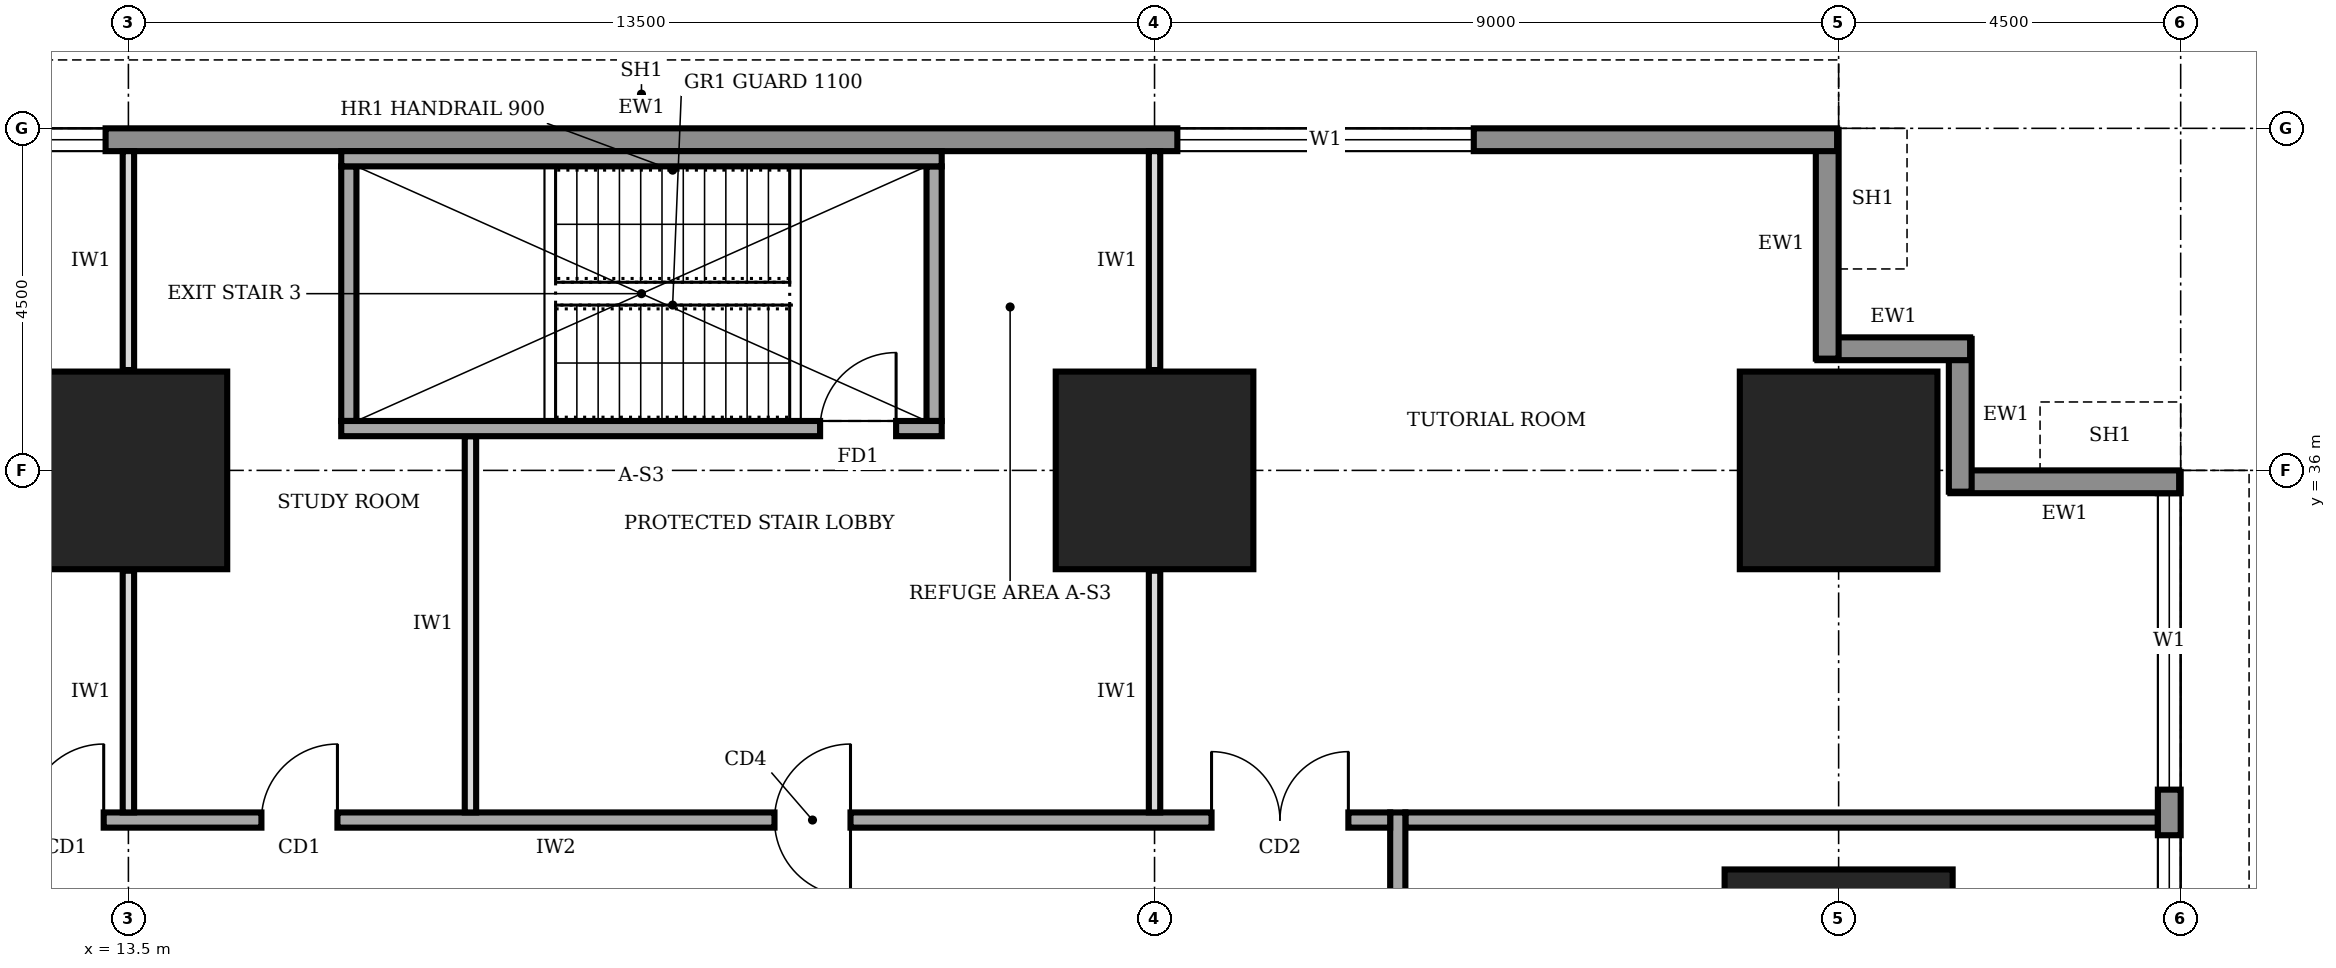
"""IFC4 building model, lengths in metres.
Left out: names, types, materials, properties, quantities, classifications, styles, units other than length and angle.
Written with IfcOpenShell. Run it as: python <this file> out.ifc"""

import sys

from ifc_helpers import new_model, si_unit, direction, frame, frame_2d, origin, origin_2d, place, context, subcontext, project, spatial, rectangle, extrude, element, fill, save


model = new_model("IFC4")
c1 = context("Model", 3, precision=1e-05, world=origin(), true_north=direction((0.0, 1.0)))
c2 = subcontext(c1, "Body", "Model", "MODEL_VIEW")
j1 = project(units=[si_unit("LENGTHUNIT", "METRE"), si_unit("PLANEANGLEUNIT", "RADIAN")], contexts=[c1])
p1 = place(None, origin())
s1 = spatial("IfcSite", under=j1, at=p1, CompositionType="ELEMENT")
p2 = place(p1, origin())
s2 = spatial("IfcBuilding", under=s1, at=p2, CompositionType="ELEMENT")
p3 = place(p2, frame((0.0, 0.0, 45.0)))
s3 = spatial("IfcBuildingStorey", under=s2, at=p3, CompositionType="ELEMENT", Elevation=45.0)
p4 = place(p3, frame((36.0, 29.25, 0.0), z_axis=(0.0, 0.0, 1.0), x_axis=(1.0, 0.0, 0.0)))
e1 = element("IfcColumn", 1, at=p4, inside=s3, PredefinedType="COLUMN", context=c2, shape_type="SweptSolid", body=[
    extrude(rectangle(XDim=3.0, YDim=3.0, at=origin_2d()), origin(), (0.0, 0.0, 1.0), 4.0),
])
for number, where, z_axis, x_axis in (
    (2, (13.5, 36.0, 0.0), (0.0, 0.0, 1.0), (1.0, 0.0, 0.0)),
    (3, (27.0, 36.0, 0.0), (0.0, 0.0, 1.0), (1.0, 0.0, 0.0)),
    (4, (36.0, 36.0, 0.0), (0.0, 0.0, 1.0), (1.0, 0.0, 0.0)),
):
    element("IfcColumn", number, at=place(p3, frame(where, z_axis=z_axis, x_axis=x_axis)), inside=s3, PredefinedType="COLUMN", context=c2, shape_type="SweptSolid", body=[
        extrude(rectangle(XDim=2.6, YDim=2.6, at=origin_2d()), origin(), (0.0, 0.0, 1.0), 4.0),
    ])
p5 = place(p3, frame((40.35, 4.52, 0.0), z_axis=(0.0, 0.0, 1.0), x_axis=(0.0, 1.0, 0.0)))
e5 = element("IfcWall", 5, at=p5, inside=s3, PredefinedType="STANDARD", context=c2, shape_type="SweptSolid", body=[
    extrude(rectangle(XDim=31.46, YDim=0.3, at=frame_2d((15.73, 0.0))), origin(), (0.0, 0.0, 1.0), 3.75),
])
p6 = place(p5, frame((4.78, 0.0, 0.9)))
e6 = element("IfcOpeningElement", 6, at=p6, cuts=e5, PredefinedType="OPENING", context=c2, shape_type="SweptSolid", body=[
    extrude(rectangle(XDim=3.9, YDim=2.2, at=frame_2d((1.95, 1.1))), frame((0.0, 0.16, 0.0), z_axis=(0.0, -1.0, 0.0), x_axis=(1.0, 0.0, 0.0)), (0.0, 0.0, 1.0), 0.32),
])
p7 = place(p5, frame((9.28, 0.0, 0.9)))
e7 = element("IfcOpeningElement", 7, at=p7, cuts=e5, PredefinedType="OPENING", context=c2, shape_type="SweptSolid", body=[
    extrude(rectangle(XDim=3.9, YDim=2.2, at=frame_2d((1.95, 1.1))), frame((0.0, 0.16, 0.0), z_axis=(0.0, -1.0, 0.0), x_axis=(1.0, 0.0, 0.0)), (0.0, 0.0, 1.0), 0.32),
])
p8 = place(p5, frame((13.78, 0.0, 0.9)))
e8 = element("IfcOpeningElement", 8, at=p8, cuts=e5, PredefinedType="OPENING", context=c2, shape_type="SweptSolid", body=[
    extrude(rectangle(XDim=3.9, YDim=2.2, at=frame_2d((1.95, 1.1))), frame((0.0, 0.16, 0.0), z_axis=(0.0, -1.0, 0.0), x_axis=(1.0, 0.0, 0.0)), (0.0, 0.0, 1.0), 0.32),
])
p9 = place(p5, frame((18.28, 0.0, 0.9)))
e9 = element("IfcOpeningElement", 9, at=p9, cuts=e5, PredefinedType="OPENING", context=c2, shape_type="SweptSolid", body=[
    extrude(rectangle(XDim=3.9, YDim=2.2, at=frame_2d((1.95, 1.1))), frame((0.0, 0.16, 0.0), z_axis=(0.0, -1.0, 0.0), x_axis=(1.0, 0.0, 0.0)), (0.0, 0.0, 1.0), 0.32),
])
p10 = place(p5, frame((22.78, 0.0, 0.9)))
e10 = element("IfcOpeningElement", 10, at=p10, cuts=e5, PredefinedType="OPENING", context=c2, shape_type="SweptSolid", body=[
    extrude(rectangle(XDim=3.9, YDim=2.2, at=frame_2d((1.95, 1.1))), frame((0.0, 0.16, 0.0), z_axis=(0.0, -1.0, 0.0), x_axis=(1.0, 0.0, 0.0)), (0.0, 0.0, 1.0), 0.32),
])
p11 = place(p5, frame((27.28, 0.0, 0.9)))
e11 = element("IfcOpeningElement", 11, at=p11, cuts=e5, PredefinedType="OPENING", context=c2, shape_type="SweptSolid", body=[
    extrude(rectangle(XDim=3.9, YDim=2.2, at=frame_2d((1.95, 1.1))), frame((0.0, 0.16, 0.0), z_axis=(0.0, -1.0, 0.0), x_axis=(1.0, 0.0, 0.0)), (0.0, 0.0, 1.0), 0.32),
])
p12 = place(p3, frame((40.48, 35.85, 0.0), z_axis=(0.0, 0.0, 1.0), x_axis=(-1.0, 0.0, 0.0)))
e12 = element("IfcWall", 12, at=p12, inside=s3, PredefinedType="STANDARD", context=c2, shape_type="SweptSolid", body=[
    extrude(rectangle(XDim=3.01, YDim=0.3, at=frame_2d((1.505, 0.0))), origin(), (0.0, 0.0, 1.0), 2.85),
])
for number, where, z_axis, x_axis in (
    (13, (37.6, 35.72, 0.0), (0.0, 0.0, 1.0), (0.0, 1.0, 0.0)),
    (14, (37.73, 37.6, 0.0), (0.0, 0.0, 1.0), (-1.0, 0.0, 0.0)),
):
    element("IfcWall", number, at=place(p3, frame(where, z_axis=z_axis, x_axis=x_axis)), inside=s3, PredefinedType="STANDARD", context=c2, shape_type="SweptSolid", body=[
        extrude(rectangle(XDim=2.01, YDim=0.3, at=frame_2d((1.005, 0.0))), origin(), (0.0, 0.0, 1.0), 3.75),
    ])
p13 = place(p3, frame((35.85, 37.47, 0.0), z_axis=(0.0, 0.0, 1.0), x_axis=(0.0, 1.0, 0.0)))
e15 = element("IfcWall", 15, at=p13, inside=s3, PredefinedType="STANDARD", context=c2, shape_type="SweptSolid", body=[
    extrude(rectangle(XDim=3.01, YDim=0.3, at=frame_2d((1.505, 0.0))), origin(), (0.0, 0.0, 1.0), 2.85),
])
p14 = place(p3, frame((35.98, 40.35, 0.0), z_axis=(0.0, 0.0, 1.0), x_axis=(-1.0, 0.0, 0.0)))
e16 = element("IfcWall", 16, at=p14, inside=s3, PredefinedType="STANDARD", context=c2, shape_type="SweptSolid", body=[
    extrude(rectangle(XDim=31.46, YDim=0.3, at=frame_2d((15.73, 0.0))), origin(), (0.0, 0.0, 1.0), 3.75),
])
p15 = place(p14, frame((27.28, 0.0, 0.9)))
e17 = element("IfcOpeningElement", 17, at=p15, cuts=e16, PredefinedType="OPENING", context=c2, shape_type="SweptSolid", body=[
    extrude(rectangle(XDim=3.9, YDim=2.2, at=frame_2d((1.95, 1.1))), frame((0.0, 0.16, 0.0), z_axis=(0.0, -1.0, 0.0), x_axis=(1.0, 0.0, 0.0)), (0.0, 0.0, 1.0), 0.32),
])
p16 = place(p14, frame((22.78, 0.0, 0.9)))
e18 = element("IfcOpeningElement", 18, at=p16, cuts=e16, PredefinedType="OPENING", context=c2, shape_type="SweptSolid", body=[
    extrude(rectangle(XDim=3.9, YDim=2.2, at=frame_2d((1.95, 1.1))), frame((0.0, 0.16, 0.0), z_axis=(0.0, -1.0, 0.0), x_axis=(1.0, 0.0, 0.0)), (0.0, 0.0, 1.0), 0.32),
])
p17 = place(p14, frame((4.78, 0.0, 0.9)))
e19 = element("IfcOpeningElement", 19, at=p17, cuts=e16, PredefinedType="OPENING", context=c2, shape_type="SweptSolid", body=[
    extrude(rectangle(XDim=3.9, YDim=2.2, at=frame_2d((1.95, 1.1))), frame((0.0, 0.16, 0.0), z_axis=(0.0, -1.0, 0.0), x_axis=(1.0, 0.0, 0.0)), (0.0, 0.0, 1.0), 0.32),
])
p18 = place(p3, frame((30.2, 9.2, 0.0), z_axis=(0.0, 0.0, 1.0), x_axis=(0.0, 1.0, 0.0)))
e20 = element("IfcWall", 20, at=p18, inside=s3, PredefinedType="SOLIDWALL", context=c2, shape_type="SweptSolid", body=[
    extrude(rectangle(XDim=22.3, YDim=0.2, at=frame_2d((11.15, 0.0))), origin(), (0.0, 0.0, 1.0), 3.75),
])
p19 = place(p18, frame((1.55, 0.0, 0.0)))
e21 = element("IfcOpeningElement", 21, at=p19, cuts=e20, PredefinedType="OPENING", context=c2, shape_type="SweptSolid", body=[
    extrude(rectangle(XDim=1.0, YDim=2.1, at=frame_2d((0.5, 1.05))), frame((0.0, 0.11, 0.0), z_axis=(0.0, -1.0, 0.0), x_axis=(1.0, 0.0, 0.0)), (0.0, 0.0, 1.0), 0.22),
])
p20 = place(p18, frame((8.3, 0.0, 0.0)))
e22 = element("IfcOpeningElement", 22, at=p20, cuts=e20, PredefinedType="OPENING", context=c2, shape_type="SweptSolid", body=[
    extrude(rectangle(XDim=1.0, YDim=2.1, at=frame_2d((0.5, 1.05))), frame((0.0, 0.11, 0.0), z_axis=(0.0, -1.0, 0.0), x_axis=(1.0, 0.0, 0.0)), (0.0, 0.0, 1.0), 0.22),
])
p21 = place(p18, frame((17.3, 0.0, 0.0)))
e23 = element("IfcOpeningElement", 23, at=p21, cuts=e20, PredefinedType="OPENING", context=c2, shape_type="SweptSolid", body=[
    extrude(rectangle(XDim=1.0, YDim=2.1, at=frame_2d((0.5, 1.05))), frame((0.0, 0.11, 0.0), z_axis=(0.0, -1.0, 0.0), x_axis=(1.0, 0.0, 0.0)), (0.0, 0.0, 1.0), 0.22),
])
p22 = place(p3, frame((30.1, 31.4, 0.0), z_axis=(0.0, 0.0, 1.0), x_axis=(-1.0, 0.0, 0.0)))
e24 = element("IfcWall", 24, at=p22, inside=s3, PredefinedType="SOLIDWALL", context=c2, shape_type="SweptSolid", body=[
    extrude(rectangle(XDim=18.4, YDim=0.2, at=frame_2d((9.2, 0.0))), origin(), (0.0, 0.0, 1.0), 3.75),
])
p23 = place(p22, frame((16.925, 0.0, 0.0)))
e25 = element("IfcOpeningElement", 25, at=p23, cuts=e24, PredefinedType="OPENING", context=c2, shape_type="SweptSolid", body=[
    extrude(rectangle(XDim=1.0, YDim=2.1, at=frame_2d((0.5, 1.05))), frame((0.0, 0.11, 0.0), z_axis=(0.0, -1.0, 0.0), x_axis=(1.0, 0.0, 0.0)), (0.0, 0.0, 1.0), 0.22),
])
p24 = place(p22, frame((13.85, 0.0, 0.0)))
e26 = element("IfcOpeningElement", 26, at=p24, cuts=e24, PredefinedType="OPENING", context=c2, shape_type="SweptSolid", body=[
    extrude(rectangle(XDim=1.0, YDim=2.1, at=frame_2d((0.5, 1.05))), frame((0.0, 0.11, 0.0), z_axis=(0.0, -1.0, 0.0), x_axis=(1.0, 0.0, 0.0)), (0.0, 0.0, 1.0), 0.22),
])
p25 = place(p22, frame((7.1, 0.0, 0.0)))
e27 = element("IfcOpeningElement", 27, at=p25, cuts=e24, PredefinedType="OPENING", context=c2, shape_type="SweptSolid", body=[
    extrude(rectangle(XDim=1.0, YDim=2.1, at=frame_2d((0.5, 1.05))), frame((0.0, 0.11, 0.0), z_axis=(0.0, -1.0, 0.0), x_axis=(1.0, 0.0, 0.0)), (0.0, 0.0, 1.0), 0.22),
])
p26 = place(p22, frame((0.55, 0.0, 0.0)))
e28 = element("IfcOpeningElement", 28, at=p26, cuts=e24, PredefinedType="OPENING", context=c2, shape_type="SweptSolid", body=[
    extrude(rectangle(XDim=1.8, YDim=2.1, at=frame_2d((0.9, 1.05))), frame((0.0, 0.11, 0.0), z_axis=(0.0, -1.0, 0.0), x_axis=(1.0, 0.0, 0.0)), (0.0, 0.0, 1.0), 0.22),
])
p27 = place(p3, frame((30.3, 31.4, 0.0), z_axis=(0.0, 0.0, 1.0), x_axis=(1.0, 0.0, 0.0)))
e29 = element("IfcWall", 29, at=p27, inside=s3, PredefinedType="SOLIDWALL", context=c2, shape_type="SweptSolid", body=[
    extrude(rectangle(XDim=9.9, YDim=0.2, at=frame_2d((4.95, 0.0))), origin(), (0.0, 0.0, 1.0), 3.75),
])
p28 = place(p3, frame((13.5, 31.5, 0.0), z_axis=(0.0, 0.0, 1.0), x_axis=(0.0, 1.0, 0.0)))
e30 = element("IfcWall", 30, at=p28, inside=s3, PredefinedType="PARTITIONING", context=c2, shape_type="SweptSolid", body=[
    extrude(rectangle(XDim=3.18, YDim=0.15, at=frame_2d((1.59, 0.0))), origin(), (0.0, 0.0, 1.0), 2.85),
])
p29 = place(p3, frame((13.5, 37.32, 0.0), z_axis=(0.0, 0.0, 1.0), x_axis=(0.0, 1.0, 0.0)))
e31 = element("IfcWall", 31, at=p29, inside=s3, PredefinedType="PARTITIONING", context=c2, shape_type="SweptSolid", body=[
    extrude(rectangle(XDim=2.88, YDim=0.15, at=frame_2d((1.44, 0.0))), origin(), (0.0, 0.0, 1.0), 2.85),
])
p30 = place(p3, frame((18.0, 31.5, 0.0), z_axis=(0.0, 0.0, 1.0), x_axis=(0.0, 1.0, 0.0)))
e32 = element("IfcWall", 32, at=p30, inside=s3, PredefinedType="PARTITIONING", context=c2, shape_type="SweptSolid", body=[
    extrude(rectangle(XDim=4.95, YDim=0.15, at=frame_2d((2.475, 0.0))), origin(), (0.0, 0.0, 1.0), 3.75),
])
p31 = place(p3, frame((27.0, 31.5, 0.0), z_axis=(0.0, 0.0, 1.0), x_axis=(0.0, 1.0, 0.0)))
e33 = element("IfcWall", 33, at=p31, inside=s3, PredefinedType="PARTITIONING", context=c2, shape_type="SweptSolid", body=[
    extrude(rectangle(XDim=3.18, YDim=0.15, at=frame_2d((1.59, 0.0))), origin(), (0.0, 0.0, 1.0), 2.85),
])
p32 = place(p3, frame((27.0, 37.32, 0.0), z_axis=(0.0, 0.0, 1.0), x_axis=(0.0, 1.0, 0.0)))
e34 = element("IfcWall", 34, at=p32, inside=s3, PredefinedType="PARTITIONING", context=c2, shape_type="SweptSolid", body=[
    extrude(rectangle(XDim=2.88, YDim=0.15, at=frame_2d((1.44, 0.0))), origin(), (0.0, 0.0, 1.0), 2.85),
])
p33 = place(p3, frame((16.3, 36.55, 0.0), z_axis=(0.0, 0.0, 1.0), x_axis=(1.0, 0.0, 0.0)))
e35 = element("IfcWall", 35, at=p33, inside=s3, PredefinedType="SOLIDWALL", context=c2, shape_type="SweptSolid", body=[
    extrude(rectangle(XDim=7.9, YDim=0.2, at=frame_2d((3.95, 0.0))), origin(), (0.0, 0.0, 1.0), 3.75),
])
p34 = place(p33, frame((6.3, 0.0, 0.0)))
e36 = element("IfcOpeningElement", 36, at=p34, cuts=e35, PredefinedType="OPENING", context=c2, shape_type="SweptSolid", body=[
    extrude(rectangle(XDim=1.0, YDim=2.1, at=frame_2d((0.5, 1.05))), frame((0.0, 0.11, 0.0), z_axis=(0.0, -1.0, 0.0), x_axis=(1.0, 0.0, 0.0)), (0.0, 0.0, 1.0), 0.22),
])
p35 = place(p3, frame((16.3, 40.1, 0.0), z_axis=(0.0, 0.0, 1.0), x_axis=(1.0, 0.0, 0.0)))
e37 = element("IfcWall", 37, at=p35, inside=s3, PredefinedType="SOLIDWALL", context=c2, shape_type="SweptSolid", body=[
    extrude(rectangle(XDim=7.9, YDim=0.2, at=frame_2d((3.95, 0.0))), origin(), (0.0, 0.0, 1.0), 3.75),
])
for number, where, z_axis, x_axis in (
    (38, (16.4, 36.65, 0.0), (0.0, 0.0, 1.0), (0.0, 1.0, 0.0)),
    (39, (24.1, 36.65, 0.0), (0.0, 0.0, 1.0), (0.0, 1.0, 0.0)),
):
    element("IfcWall", number, at=place(p3, frame(where, z_axis=z_axis, x_axis=x_axis)), inside=s3, PredefinedType="SOLIDWALL", context=c2, shape_type="SweptSolid", body=[
        extrude(rectangle(XDim=3.35, YDim=0.2, at=frame_2d((1.675, 0.0))), origin(), (0.0, 0.0, 1.0), 3.75),
    ])
p36 = place(p10, origin())
e40 = element("IfcWindow", 40, at=p36, inside=s3, PartitioningType="SINGLE_PANEL", PredefinedType="WINDOW", context=c2, shape_type="SweptSolid", body=[
    extrude(rectangle(XDim=3.9, YDim=2.2, at=frame_2d((1.95, 1.1))), frame((0.0, 0.03, 0.0), z_axis=(0.0, -1.0, 0.0), x_axis=(1.0, 0.0, 0.0)), (0.0, 0.0, 1.0), 0.06),
])
fill(e10, e40)
p37 = place(p11, origin())
e41 = element("IfcWindow", 41, at=p37, inside=s3, PartitioningType="SINGLE_PANEL", PredefinedType="WINDOW", context=c2, shape_type="SweptSolid", body=[
    extrude(rectangle(XDim=3.9, YDim=2.2, at=frame_2d((1.95, 1.1))), frame((0.0, 0.03, 0.0), z_axis=(0.0, -1.0, 0.0), x_axis=(1.0, 0.0, 0.0)), (0.0, 0.0, 1.0), 0.06),
])
fill(e11, e41)
p38 = place(p16, origin())
e42 = element("IfcWindow", 42, at=p38, inside=s3, PartitioningType="SINGLE_PANEL", PredefinedType="WINDOW", context=c2, shape_type="SweptSolid", body=[
    extrude(rectangle(XDim=3.9, YDim=2.2, at=frame_2d((1.95, 1.1))), frame((0.0, 0.03, 0.0), z_axis=(0.0, -1.0, 0.0), x_axis=(1.0, 0.0, 0.0)), (0.0, 0.0, 1.0), 0.06),
])
fill(e18, e42)
p39 = place(p17, origin())
e43 = element("IfcWindow", 43, at=p39, inside=s3, PartitioningType="SINGLE_PANEL", PredefinedType="WINDOW", context=c2, shape_type="SweptSolid", body=[
    extrude(rectangle(XDim=3.9, YDim=2.2, at=frame_2d((1.95, 1.1))), frame((0.0, 0.03, 0.0), z_axis=(0.0, -1.0, 0.0), x_axis=(1.0, 0.0, 0.0)), (0.0, 0.0, 1.0), 0.06),
])
fill(e19, e43)
p40 = place(p23, frame((1.0, 0.0, 0.0), z_axis=(0.0, 0.0, 1.0), x_axis=(-1.0, 0.0, 0.0)))
e44 = element("IfcDoor", 44, at=p40, inside=s3, OperationType="SINGLE_SWING_RIGHT", PredefinedType="DOOR", context=c2, shape_type="SweptSolid", body=[
    extrude(rectangle(XDim=1.0, YDim=2.1, at=frame_2d((0.5, 1.05))), frame((0.0, 0.025, 0.0), z_axis=(0.0, -1.0, 0.0), x_axis=(1.0, 0.0, 0.0)), (0.0, 0.0, 1.0), 0.05),
])
fill(e25, e44)
p41 = place(p24, frame((1.0, 0.0, 0.0), z_axis=(0.0, 0.0, 1.0), x_axis=(-1.0, 0.0, 0.0)))
e45 = element("IfcDoor", 45, at=p41, inside=s3, OperationType="SINGLE_SWING_RIGHT", PredefinedType="DOOR", context=c2, shape_type="SweptSolid", body=[
    extrude(rectangle(XDim=1.0, YDim=2.1, at=frame_2d((0.5, 1.05))), frame((0.0, 0.025, 0.0), z_axis=(0.0, -1.0, 0.0), x_axis=(1.0, 0.0, 0.0)), (0.0, 0.0, 1.0), 0.05),
])
fill(e26, e45)
p42 = place(p25, origin())
e46 = element("IfcDoor", 46, at=p42, inside=s3, OperationType="DOUBLE_SWING_LEFT", PredefinedType="DOOR", context=c2, shape_type="SweptSolid", body=[
    extrude(rectangle(XDim=1.0, YDim=2.1, at=frame_2d((0.5, 1.05))), frame((0.0, 0.025, 0.0), z_axis=(0.0, -1.0, 0.0), x_axis=(1.0, 0.0, 0.0)), (0.0, 0.0, 1.0), 0.05),
])
fill(e27, e46)
p43 = place(p26, frame((1.8, 0.0, 0.0), z_axis=(0.0, 0.0, 1.0), x_axis=(-1.0, 0.0, 0.0)))
e47 = element("IfcDoor", 47, at=p43, inside=s3, OperationType="DOUBLE_DOOR_SINGLE_SWING", PredefinedType="DOOR", context=c2, shape_type="SweptSolid", body=[
    extrude(rectangle(XDim=1.8, YDim=2.1, at=frame_2d((0.9, 1.05))), frame((0.0, 0.025, 0.0), z_axis=(0.0, -1.0, 0.0), x_axis=(1.0, 0.0, 0.0)), (0.0, 0.0, 1.0), 0.05),
])
fill(e28, e47)
p44 = place(p34, origin())
e48 = element("IfcDoor", 48, at=p44, inside=s3, OperationType="SINGLE_SWING_RIGHT", PredefinedType="DOOR", context=c2, shape_type="SweptSolid", body=[
    extrude(rectangle(XDim=1.0, YDim=2.1, at=frame_2d((0.5, 1.05))), frame((0.0, 0.025, 0.0), z_axis=(0.0, -1.0, 0.0), x_axis=(1.0, 0.0, 0.0)), (0.0, 0.0, 1.0), 0.05),
])
fill(e36, e48)
save(model, sys.argv[1])
